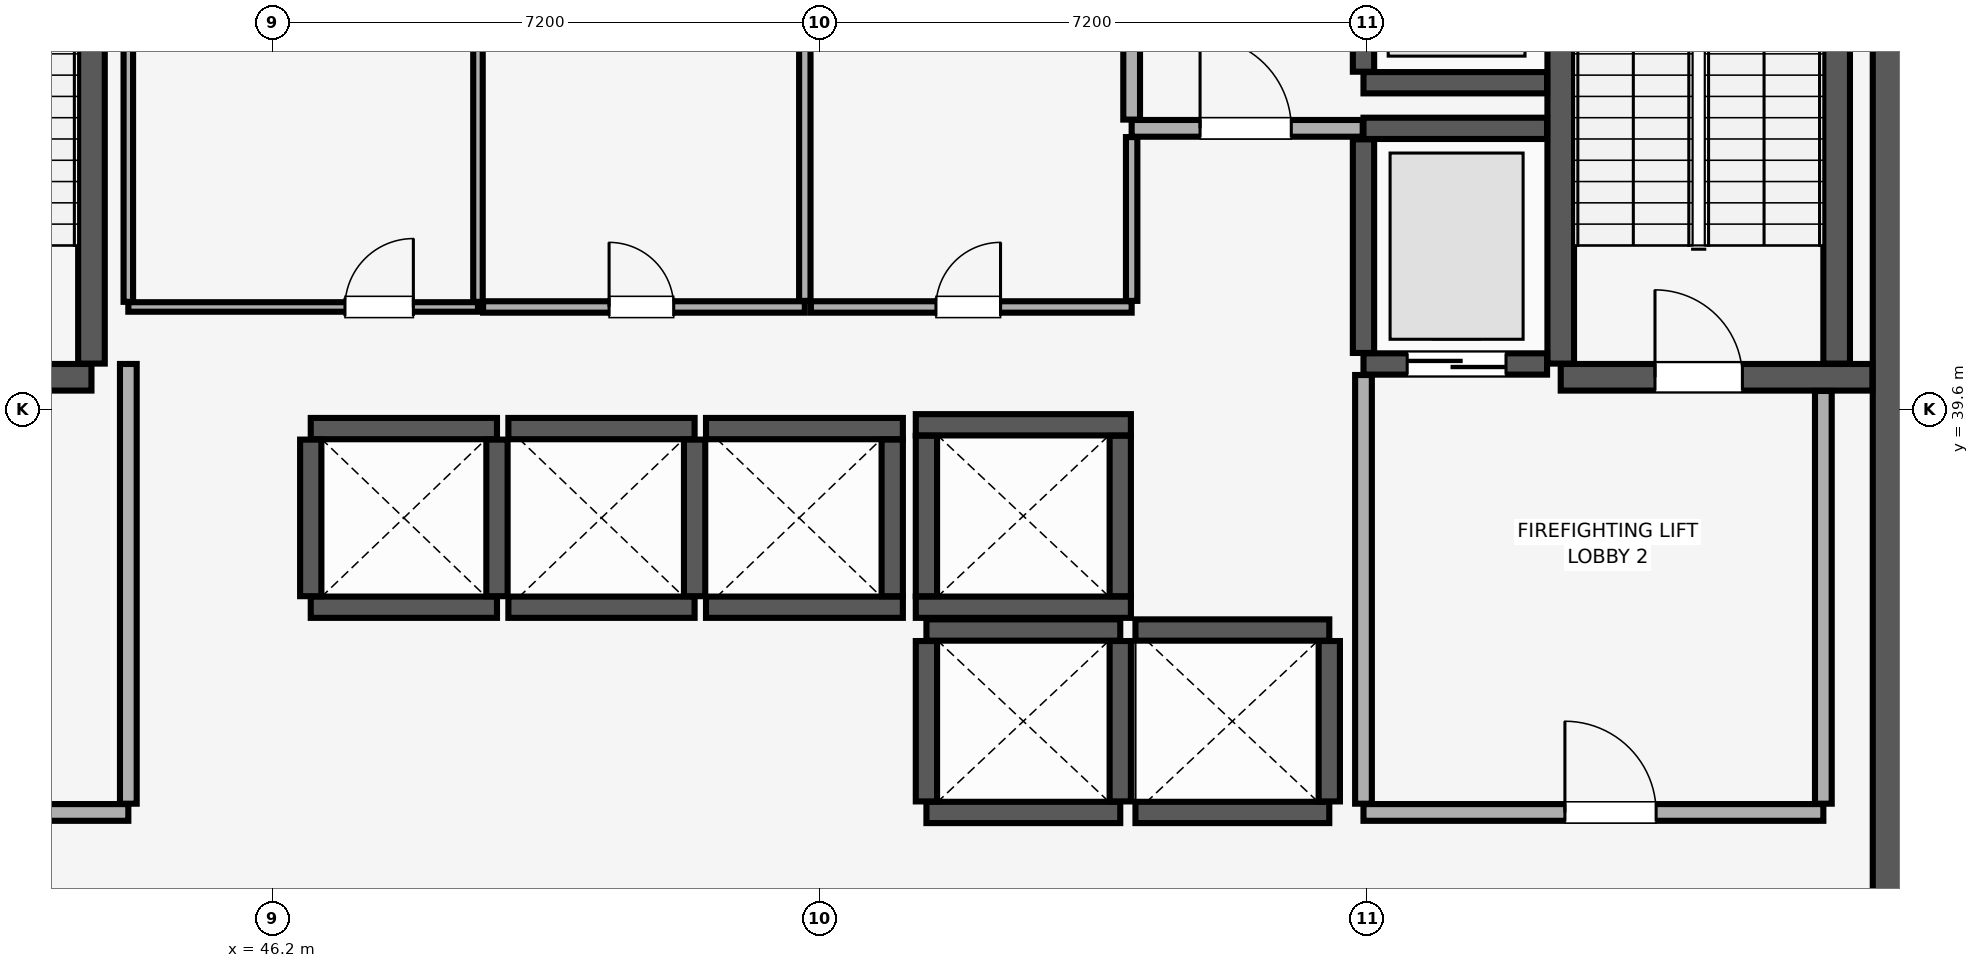
"""IFC4 building model, lengths in metres.
Left out: names, types, materials, properties, quantities, classifications, styles, units other than length and angle.
Written with IfcOpenShell. Run it as: python <this file> out.ifc"""

import sys

from ifc_helpers import new_model, si_unit, direction, frame, frame_2d, origin, place, context, subcontext, project, spatial, rectangle, extrude, element, fill, save


model = new_model("IFC4")
c1 = context("Model", 3, precision=1e-05, world=origin(), true_north=direction((0.0, 1.0)))
c2 = subcontext(c1, "Body", "Model", "MODEL_VIEW")
j1 = project(units=[si_unit("LENGTHUNIT", "METRE"), si_unit("PLANEANGLEUNIT", "RADIAN")], contexts=[c1])
p1 = place(None, origin())
s1 = spatial("IfcSite", under=j1, at=p1, CompositionType="ELEMENT")
p2 = place(p1, origin())
s2 = spatial("IfcBuilding", under=s1, at=p2, CompositionType="ELEMENT")
p3 = place(p2, frame((0.0, 0.0, 46.4)))
s3 = spatial("IfcBuildingStorey", under=s2, at=p3, CompositionType="ELEMENT", Elevation=46.4)
p4 = place(p3, frame((67.8, 29.4, 0.0), z_axis=(0.0, 0.0, 1.0), x_axis=(0.0, 1.0, 0.0)))
e1 = element("IfcWall", 1, at=p4, inside=s3, PredefinedType="SHEAR", context=c2, shape_type="SweptSolid", body=[
    extrude(rectangle(XDim=19.2, YDim=1.1, at=frame_2d((9.6, 0.0))), origin(), (0.0, 0.0, 1.0), 3.51),
])
p5 = place(p3, frame((40.185, 40.025, 0.0), z_axis=(0.0, 0.0, 1.0), x_axis=(1.0, 0.0, 0.0)))
e2 = element("IfcWall", 2, at=p5, inside=s3, PredefinedType="SHEAR", context=c2, shape_type="SweptSolid", body=[
    extrude(rectangle(XDim=3.63, YDim=0.35, at=frame_2d((1.815, 0.0))), origin(), (0.0, 0.0, 1.0), 3.51),
])
p6 = place(p5, frame((1.24, 0.0, 0.0)))
e3 = element("IfcOpeningElement", 3, at=p6, cuts=e2, PredefinedType="OPENING", context=c2, shape_type="SweptSolid", body=[
    extrude(rectangle(XDim=1.15, YDim=2.15, at=frame_2d((0.575, 1.075))), frame((0.0, 0.185, 0.0), z_axis=(0.0, -1.0, 0.0), x_axis=(1.0, 0.0, 0.0)), (0.0, 0.0, 1.0), 0.37),
])
p7 = place(p3, frame((43.815, 40.205, 0.0), z_axis=(0.0, 0.0, 1.0), x_axis=(0.0, 1.0, 0.0)))
e4 = element("IfcWall", 4, at=p7, inside=s3, PredefinedType="SHEAR", context=c2, shape_type="SweptSolid", body=[
    extrude(rectangle(XDim=8.09, YDim=0.35, at=frame_2d((4.045, 0.0))), origin(), (0.0, 0.0, 1.0), 3.51),
])
p8 = place(p3, frame((63.145, 40.025, 0.0), z_axis=(0.0, 0.0, 1.0), x_axis=(1.0, 0.0, 0.0)))
e5 = element("IfcWall", 5, at=p8, inside=s3, PredefinedType="SHEAR", context=c2, shape_type="SweptSolid", body=[
    extrude(rectangle(XDim=4.1, YDim=0.35, at=frame_2d((2.05, 0.0))), origin(), (0.0, 0.0, 1.0), 3.51),
])
p9 = place(p8, frame((1.24, 0.0, 0.0)))
e6 = element("IfcOpeningElement", 6, at=p9, cuts=e5, PredefinedType="OPENING", context=c2, shape_type="SweptSolid", body=[
    extrude(rectangle(XDim=1.15, YDim=2.15, at=frame_2d((0.575, 1.075))), frame((0.0, 0.185, 0.0), z_axis=(0.0, -1.0, 0.0), x_axis=(1.0, 0.0, 0.0)), (0.0, 0.0, 1.0), 0.37),
])
for number, where, z_axis, x_axis in (
    (7, (63.145, 40.205, 0.0), (0.0, 0.0, 1.0), (0.0, 1.0, 0.0)),
    (8, (66.775, 40.205, 0.0), (0.0, 0.0, 1.0), (0.0, 1.0, 0.0)),
):
    element("IfcWall", number, at=place(p3, frame(where, z_axis=z_axis, x_axis=x_axis)), inside=s3, PredefinedType="SHEAR", context=c2, shape_type="SweptSolid", body=[
        extrude(rectangle(XDim=8.09, YDim=0.35, at=frame_2d((4.045, 0.0))), origin(), (0.0, 0.0, 1.0), 3.51),
    ])
for number, where, z_axis, x_axis in (
    (9, (46.7, 37.0, 0.0), (0.0, 0.0, 1.0), (1.0, 0.0, 0.0)),
    (10, (46.7, 39.35, 0.0), (0.0, 0.0, 1.0), (1.0, 0.0, 0.0)),
):
    element("IfcWall", number, at=place(p3, frame(where, z_axis=z_axis, x_axis=x_axis)), inside=s3, PredefinedType="SHEAR", context=c2, shape_type="SweptSolid", body=[
        extrude(rectangle(XDim=2.45, YDim=0.28, at=frame_2d((1.225, 0.0))), origin(), (0.0, 0.0, 1.0), 3.51),
    ])
for number, where, z_axis, x_axis in (
    (11, (46.7, 37.145, 0.0), (0.0, 0.0, 1.0), (0.0, 1.0, 0.0)),
    (12, (49.15, 37.145, 0.0), (0.0, 0.0, 1.0), (0.0, 1.0, 0.0)),
):
    element("IfcWall", number, at=place(p3, frame(where, z_axis=z_axis, x_axis=x_axis)), inside=s3, PredefinedType="SHEAR", context=c2, shape_type="SweptSolid", body=[
        extrude(rectangle(XDim=2.06, YDim=0.28, at=frame_2d((1.03, 0.0))), origin(), (0.0, 0.0, 1.0), 3.51),
    ])
for number, where, z_axis, x_axis in (
    (13, (49.3, 37.0, 0.0), (0.0, 0.0, 1.0), (1.0, 0.0, 0.0)),
    (14, (49.3, 39.35, 0.0), (0.0, 0.0, 1.0), (1.0, 0.0, 0.0)),
):
    element("IfcWall", number, at=place(p3, frame(where, z_axis=z_axis, x_axis=x_axis)), inside=s3, PredefinedType="SHEAR", context=c2, shape_type="SweptSolid", body=[
        extrude(rectangle(XDim=2.45, YDim=0.28, at=frame_2d((1.225, 0.0))), origin(), (0.0, 0.0, 1.0), 3.51),
    ])
p10 = place(p3, frame((51.75, 37.145, 0.0), z_axis=(0.0, 0.0, 1.0), x_axis=(0.0, 1.0, 0.0)))
e15 = element("IfcWall", 15, at=p10, inside=s3, PredefinedType="SHEAR", context=c2, shape_type="SweptSolid", body=[
    extrude(rectangle(XDim=2.06, YDim=0.28, at=frame_2d((1.03, 0.0))), origin(), (0.0, 0.0, 1.0), 3.51),
])
for number, where, z_axis, x_axis in (
    (16, (51.9, 37.0, 0.0), (0.0, 0.0, 1.0), (1.0, 0.0, 0.0)),
    (17, (51.9, 39.35, 0.0), (0.0, 0.0, 1.0), (1.0, 0.0, 0.0)),
):
    element("IfcWall", number, at=place(p3, frame(where, z_axis=z_axis, x_axis=x_axis)), inside=s3, PredefinedType="SHEAR", context=c2, shape_type="SweptSolid", body=[
        extrude(rectangle(XDim=2.59, YDim=0.28, at=frame_2d((1.295, 0.0))), origin(), (0.0, 0.0, 1.0), 3.51),
    ])
p11 = place(p3, frame((54.35, 37.145, 0.0), z_axis=(0.0, 0.0, 1.0), x_axis=(0.0, 1.0, 0.0)))
e18 = element("IfcWall", 18, at=p11, inside=s3, PredefinedType="SHEAR", context=c2, shape_type="SweptSolid", body=[
    extrude(rectangle(XDim=2.06, YDim=0.28, at=frame_2d((1.03, 0.0))), origin(), (0.0, 0.0, 1.0), 3.51),
])
for number, where, z_axis, x_axis in (
    (19, (54.8, 34.3, 0.0), (0.0, 0.0, 1.0), (1.0, 0.0, 0.0)),
    (20, (54.8, 36.7, 0.0), (0.0, 0.0, 1.0), (1.0, 0.0, 0.0)),
):
    element("IfcWall", number, at=place(p3, frame(where, z_axis=z_axis, x_axis=x_axis)), inside=s3, PredefinedType="SHEAR", context=c2, shape_type="SweptSolid", body=[
        extrude(rectangle(XDim=2.55, YDim=0.28, at=frame_2d((1.275, 0.0))), origin(), (0.0, 0.0, 1.0), 3.51),
    ])
for number, where, z_axis, x_axis in (
    (21, (54.8, 34.445, 0.0), (0.0, 0.0, 1.0), (0.0, 1.0, 0.0)),
    (22, (57.35, 34.445, 0.0), (0.0, 0.0, 1.0), (0.0, 1.0, 0.0)),
):
    element("IfcWall", number, at=place(p3, frame(where, z_axis=z_axis, x_axis=x_axis)), inside=s3, PredefinedType="SHEAR", context=c2, shape_type="SweptSolid", body=[
        extrude(rectangle(XDim=2.11, YDim=0.28, at=frame_2d((1.055, 0.0))), origin(), (0.0, 0.0, 1.0), 3.51),
    ])
for number, where, z_axis, x_axis in (
    (23, (57.55, 34.3, 0.0), (0.0, 0.0, 1.0), (1.0, 0.0, 0.0)),
    (24, (57.55, 36.7, 0.0), (0.0, 0.0, 1.0), (1.0, 0.0, 0.0)),
):
    element("IfcWall", number, at=place(p3, frame(where, z_axis=z_axis, x_axis=x_axis)), inside=s3, PredefinedType="SHEAR", context=c2, shape_type="SweptSolid", body=[
        extrude(rectangle(XDim=2.55, YDim=0.28, at=frame_2d((1.275, 0.0))), origin(), (0.0, 0.0, 1.0), 3.51),
    ])
p12 = place(p3, frame((60.1, 34.445, 0.0), z_axis=(0.0, 0.0, 1.0), x_axis=(0.0, 1.0, 0.0)))
e25 = element("IfcWall", 25, at=p12, inside=s3, PredefinedType="SHEAR", context=c2, shape_type="SweptSolid", body=[
    extrude(rectangle(XDim=2.11, YDim=0.28, at=frame_2d((1.055, 0.0))), origin(), (0.0, 0.0, 1.0), 3.51),
])
for number, where, z_axis, x_axis in (
    (26, (54.66, 37.0, 0.0), (0.0, 0.0, 1.0), (1.0, 0.0, 0.0)),
    (27, (54.66, 39.4, 0.0), (0.0, 0.0, 1.0), (1.0, 0.0, 0.0)),
):
    element("IfcWall", number, at=place(p3, frame(where, z_axis=z_axis, x_axis=x_axis)), inside=s3, PredefinedType="SHEAR", context=c2, shape_type="SweptSolid", body=[
        extrude(rectangle(XDim=2.83, YDim=0.28, at=frame_2d((1.415, 0.0))), origin(), (0.0, 0.0, 1.0), 3.51),
    ])
for number, where, z_axis, x_axis in (
    (28, (54.8, 37.145, 0.0), (0.0, 0.0, 1.0), (0.0, 1.0, 0.0)),
    (29, (57.35, 37.145, 0.0), (0.0, 0.0, 1.0), (0.0, 1.0, 0.0)),
):
    element("IfcWall", number, at=place(p3, frame(where, z_axis=z_axis, x_axis=x_axis)), inside=s3, PredefinedType="SHEAR", context=c2, shape_type="SweptSolid", body=[
        extrude(rectangle(XDim=2.11, YDim=0.28, at=frame_2d((1.055, 0.0))), origin(), (0.0, 0.0, 1.0), 3.51),
    ])
p13 = place(p3, frame((60.55, 40.2, 0.0), z_axis=(0.0, 0.0, 1.0), x_axis=(1.0, 0.0, 0.0)))
e30 = element("IfcWall", 30, at=p13, inside=s3, PredefinedType="SHEAR", context=c2, shape_type="SweptSolid", body=[
    extrude(rectangle(XDim=2.415, YDim=0.28, at=frame_2d((1.208, 0.0))), origin(), (0.0, 0.0, 1.0), 3.51),
])
p14 = place(p13, frame((0.575, 0.0, 0.0)))
e31 = element("IfcOpeningElement", 31, at=p14, cuts=e30, PredefinedType="OPENING", context=c2, shape_type="SweptSolid", body=[
    extrude(rectangle(XDim=1.3, YDim=2.3, at=frame_2d((0.65, 1.15))), frame((0.0, 0.15, 0.0), z_axis=(0.0, -1.0, 0.0), x_axis=(1.0, 0.0, 0.0)), (0.0, 0.0, 1.0), 0.3),
])
p15 = place(p3, frame((60.55, 43.3, 0.0), z_axis=(0.0, 0.0, 1.0), x_axis=(1.0, 0.0, 0.0)))
e32 = element("IfcWall", 32, at=p15, inside=s3, PredefinedType="SHEAR", context=c2, shape_type="SweptSolid", body=[
    extrude(rectangle(XDim=2.415, YDim=0.28, at=frame_2d((1.208, 0.0))), origin(), (0.0, 0.0, 1.0), 3.51),
])
p16 = place(p3, frame((60.55, 40.345, 0.0), z_axis=(0.0, 0.0, 1.0), x_axis=(0.0, 1.0, 0.0)))
e33 = element("IfcWall", 33, at=p16, inside=s3, PredefinedType="SHEAR", context=c2, shape_type="SweptSolid", body=[
    extrude(rectangle(XDim=2.81, YDim=0.28, at=frame_2d((1.405, 0.0))), origin(), (0.0, 0.0, 1.0), 3.51),
])
p17 = place(p3, frame((60.55, 43.9, 0.0), z_axis=(0.0, 0.0, 1.0), x_axis=(1.0, 0.0, 0.0)))
e34 = element("IfcWall", 34, at=p17, inside=s3, PredefinedType="SHEAR", context=c2, shape_type="SweptSolid", body=[
    extrude(rectangle(XDim=2.415, YDim=0.28, at=frame_2d((1.208, 0.0))), origin(), (0.0, 0.0, 1.0), 3.51),
])
p18 = place(p3, frame((60.55, 44.045, 0.0), z_axis=(0.0, 0.0, 1.0), x_axis=(0.0, 1.0, 0.0)))
e35 = element("IfcWall", 35, at=p18, inside=s3, PredefinedType="SHEAR", context=c2, shape_type="SweptSolid", body=[
    extrude(rectangle(XDim=3.11, YDim=0.28, at=frame_2d((1.555, 0.0))), origin(), (0.0, 0.0, 1.0), 3.51),
])
p19 = place(p18, frame((0.905, 0.0, 0.0)))
e36 = element("IfcOpeningElement", 36, at=p19, cuts=e35, PredefinedType="OPENING", context=c2, shape_type="SweptSolid", body=[
    extrude(rectangle(XDim=1.3, YDim=2.3, at=frame_2d((0.65, 1.15))), frame((0.0, 0.15, 0.0), z_axis=(0.0, -1.0, 0.0), x_axis=(1.0, 0.0, 0.0)), (0.0, 0.0, 1.0), 0.3),
])
p20 = place(p3, frame((60.55, 34.3, 0.0), z_axis=(0.0, 0.0, 1.0), x_axis=(1.0, 0.0, 0.0)))
e37 = element("IfcWall", 37, at=p20, inside=s3, PredefinedType="PARTITIONING", context=c2, shape_type="SweptSolid", body=[
    extrude(rectangle(XDim=6.05, YDim=0.22, at=frame_2d((3.025, 0.0))), origin(), (0.0, 0.0, 1.0), 3.51),
])
p21 = place(p20, frame((2.65, 0.0, 0.0)))
e38 = element("IfcOpeningElement", 38, at=p21, cuts=e37, PredefinedType="OPENING", context=c2, shape_type="SweptSolid", body=[
    extrude(rectangle(XDim=1.2, YDim=2.15, at=frame_2d((0.6, 1.075))), frame((0.0, 0.12, 0.0), z_axis=(0.0, -1.0, 0.0), x_axis=(1.0, 0.0, 0.0)), (0.0, 0.0, 1.0), 0.24),
])
p22 = place(p3, frame((60.55, 34.415, 0.0), z_axis=(0.0, 0.0, 1.0), x_axis=(0.0, 1.0, 0.0)))
e39 = element("IfcWall", 39, at=p22, inside=s3, PredefinedType="PARTITIONING", context=c2, shape_type="SweptSolid", body=[
    extrude(rectangle(XDim=5.64, YDim=0.22, at=frame_2d((2.82, 0.0))), origin(), (0.0, 0.0, 1.0), 3.51),
])
p23 = place(p3, frame((66.6, 34.415, 0.0), z_axis=(0.0, 0.0, 1.0), x_axis=(0.0, 1.0, 0.0)))
e40 = element("IfcWall", 40, at=p23, inside=s3, PredefinedType="PARTITIONING", context=c2, shape_type="SweptSolid", body=[
    extrude(rectangle(XDim=5.43, YDim=0.22, at=frame_2d((2.715, 0.0))), origin(), (0.0, 0.0, 1.0), 3.51),
])
p24 = place(p3, frame((39.7, 34.3, 0.0), z_axis=(0.0, 0.0, 1.0), x_axis=(1.0, 0.0, 0.0)))
e41 = element("IfcWall", 41, at=p24, inside=s3, PredefinedType="PARTITIONING", context=c2, shape_type="SweptSolid", body=[
    extrude(rectangle(XDim=4.6, YDim=0.22, at=frame_2d((2.3, 0.0))), origin(), (0.0, 0.0, 1.0), 3.51),
])
p25 = place(p24, frame((1.7, 0.0, 0.0)))
e42 = element("IfcOpeningElement", 42, at=p25, cuts=e41, PredefinedType="OPENING", context=c2, shape_type="SweptSolid", body=[
    extrude(rectangle(XDim=1.2, YDim=2.15, at=frame_2d((0.6, 1.075))), frame((0.0, 0.12, 0.0), z_axis=(0.0, -1.0, 0.0), x_axis=(1.0, 0.0, 0.0)), (0.0, 0.0, 1.0), 0.24),
])
p26 = place(p3, frame((44.3, 34.415, 0.0), z_axis=(0.0, 0.0, 1.0), x_axis=(0.0, 1.0, 0.0)))
e43 = element("IfcWall", 43, at=p26, inside=s3, PredefinedType="PARTITIONING", context=c2, shape_type="SweptSolid", body=[
    extrude(rectangle(XDim=5.785, YDim=0.22, at=frame_2d((2.893, 0.0))), origin(), (0.0, 0.0, 1.0), 3.51),
])
p27 = place(p3, frame((57.5, 43.3, 0.0), z_axis=(0.0, 0.0, 1.0), x_axis=(1.0, 0.0, 0.0)))
e44 = element("IfcWall", 44, at=p27, inside=s3, PredefinedType="PARTITIONING", context=c2, shape_type="SweptSolid", body=[
    extrude(rectangle(XDim=3.04, YDim=0.22, at=frame_2d((1.52, 0.0))), origin(), (0.0, 0.0, 1.0), 3.51),
])
p28 = place(p27, frame((0.9, 0.0, 0.0)))
e45 = element("IfcOpeningElement", 45, at=p28, cuts=e44, PredefinedType="OPENING", context=c2, shape_type="SweptSolid", body=[
    extrude(rectangle(XDim=1.2, YDim=2.15, at=frame_2d((0.6, 1.075))), frame((0.0, 0.12, 0.0), z_axis=(0.0, -1.0, 0.0), x_axis=(1.0, 0.0, 0.0)), (0.0, 0.0, 1.0), 0.24),
])
p29 = place(p3, frame((57.5, 43.415, 0.0), z_axis=(0.0, 0.0, 1.0), x_axis=(0.0, 1.0, 0.0)))
e46 = element("IfcWall", 46, at=p29, inside=s3, PredefinedType="PARTITIONING", context=c2, shape_type="SweptSolid", body=[
    extrude(rectangle(XDim=5.435, YDim=0.22, at=frame_2d((2.718, 0.0))), origin(), (0.0, 0.0, 1.0), 3.51),
])
p30 = place(p3, frame((44.3, 40.95, 0.0), z_axis=(0.0, 0.0, 1.0), x_axis=(1.0, 0.0, 0.0)))
e47 = element("IfcWall", 47, at=p30, inside=s3, PredefinedType="PARTITIONING", context=c2, shape_type="SweptSolid", body=[
    extrude(rectangle(XDim=4.6, YDim=0.125, at=frame_2d((2.3, 0.0))), origin(), (0.0, 0.0, 1.0), 3.51),
])
p31 = place(p30, frame((2.85, 0.0, 0.0)))
e48 = element("IfcOpeningElement", 48, at=p31, cuts=e47, PredefinedType="OPENING", context=c2, shape_type="SweptSolid", body=[
    extrude(rectangle(XDim=0.9, YDim=2.1, at=frame_2d((0.45, 1.05))), frame((0.0, 0.073, 0.0), z_axis=(0.0, -1.0, 0.0), x_axis=(1.0, 0.0, 0.0)), (0.0, 0.0, 1.0), 0.145),
])
for number, where, z_axis, x_axis in (
    (49, (44.3, 41.018, 0.0), (0.0, 0.0, 1.0), (0.0, 1.0, 0.0)),
    (50, (48.9, 41.018, 0.0), (0.0, 0.0, 1.0), (0.0, 1.0, 0.0)),
):
    element("IfcWall", number, at=place(p3, frame(where, z_axis=z_axis, x_axis=x_axis)), inside=s3, PredefinedType="PARTITIONING", context=c2, shape_type="SweptSolid", body=[
        extrude(rectangle(XDim=3.515, YDim=0.125, at=frame_2d((1.757, 0.0))), origin(), (0.0, 0.0, 1.0), 3.51),
    ])
p32 = place(p3, frame((48.968, 40.95, 0.0), z_axis=(0.0, 0.0, 1.0), x_axis=(1.0, 0.0, 0.0)))
e51 = element("IfcWall", 51, at=p32, inside=s3, PredefinedType="PARTITIONING", context=c2, shape_type="SweptSolid", body=[
    extrude(rectangle(XDim=4.232, YDim=0.15, at=frame_2d((2.116, 0.0))), origin(), (0.0, 0.0, 1.0), 3.51),
])
p33 = place(p32, frame((1.657, 0.0, 0.0)))
e52 = element("IfcOpeningElement", 52, at=p33, cuts=e51, PredefinedType="OPENING", context=c2, shape_type="SweptSolid", body=[
    extrude(rectangle(XDim=0.85, YDim=2.1, at=frame_2d((0.425, 1.05))), frame((0.0, 0.085, 0.0), z_axis=(0.0, -1.0, 0.0), x_axis=(1.0, 0.0, 0.0)), (0.0, 0.0, 1.0), 0.17),
])
p34 = place(p3, frame((53.2, 41.03, 0.0), z_axis=(0.0, 0.0, 1.0), x_axis=(0.0, 1.0, 0.0)))
e53 = element("IfcWall", 53, at=p34, inside=s3, PredefinedType="PARTITIONING", context=c2, shape_type="SweptSolid", body=[
    extrude(rectangle(XDim=7.82, YDim=0.15, at=frame_2d((3.91, 0.0))), origin(), (0.0, 0.0, 1.0), 3.51),
])
p35 = place(p3, frame((53.28, 40.95, 0.0), z_axis=(0.0, 0.0, 1.0), x_axis=(1.0, 0.0, 0.0)))
e54 = element("IfcWall", 54, at=p35, inside=s3, PredefinedType="PARTITIONING", context=c2, shape_type="SweptSolid", body=[
    extrude(rectangle(XDim=4.22, YDim=0.15, at=frame_2d((2.11, 0.0))), origin(), (0.0, 0.0, 1.0), 3.51),
])
p36 = place(p35, frame((1.645, 0.0, 0.0)))
e55 = element("IfcOpeningElement", 55, at=p36, cuts=e54, PredefinedType="OPENING", context=c2, shape_type="SweptSolid", body=[
    extrude(rectangle(XDim=0.85, YDim=2.1, at=frame_2d((0.425, 1.05))), frame((0.0, 0.085, 0.0), z_axis=(0.0, -1.0, 0.0), x_axis=(1.0, 0.0, 0.0)), (0.0, 0.0, 1.0), 0.17),
])
p37 = place(p3, frame((57.5, 41.03, 0.0), z_axis=(0.0, 0.0, 1.0), x_axis=(0.0, 1.0, 0.0)))
e56 = element("IfcWall", 56, at=p37, inside=s3, PredefinedType="PARTITIONING", context=c2, shape_type="SweptSolid", body=[
    extrude(rectangle(XDim=2.155, YDim=0.15, at=frame_2d((1.078, 0.0))), origin(), (0.0, 0.0, 1.0), 3.51),
])
p38 = place(p9, origin())
e57 = element("IfcDoor", 57, at=p38, inside=s3, OperationType="SINGLE_SWING_LEFT", PredefinedType="DOOR", context=c2, shape_type="SweptSolid", body=[
    extrude(rectangle(XDim=1.15, YDim=2.15, at=frame_2d((0.575, 1.075))), frame((0.0, 0.025, 0.0), z_axis=(0.0, -1.0, 0.0), x_axis=(1.0, 0.0, 0.0)), (0.0, 0.0, 1.0), 0.05),
])
fill(e6, e57)
p39 = place(p14, origin())
e58 = element("IfcDoor", 58, at=p39, inside=s3, OperationType="DOUBLE_DOOR_SLIDING", PredefinedType="DOOR", context=c2, shape_type="SweptSolid", body=[
    extrude(rectangle(XDim=1.3, YDim=2.3, at=frame_2d((0.65, 1.15))), frame((0.0, 0.025, 0.0), z_axis=(0.0, -1.0, 0.0), x_axis=(1.0, 0.0, 0.0)), (0.0, 0.0, 1.0), 0.05),
])
fill(e31, e58)
p40 = place(p21, origin())
e59 = element("IfcDoor", 59, at=p40, inside=s3, OperationType="SINGLE_SWING_LEFT", PredefinedType="DOOR", context=c2, shape_type="SweptSolid", body=[
    extrude(rectangle(XDim=1.2, YDim=2.15, at=frame_2d((0.6, 1.075))), frame((0.0, 0.025, 0.0), z_axis=(0.0, -1.0, 0.0), x_axis=(1.0, 0.0, 0.0)), (0.0, 0.0, 1.0), 0.05),
])
fill(e38, e59)
p41 = place(p28, origin())
e60 = element("IfcDoor", 60, at=p41, inside=s3, OperationType="SINGLE_SWING_LEFT", PredefinedType="DOOR", context=c2, shape_type="SweptSolid", body=[
    extrude(rectangle(XDim=1.2, YDim=2.15, at=frame_2d((0.6, 1.075))), frame((0.0, 0.025, 0.0), z_axis=(0.0, -1.0, 0.0), x_axis=(1.0, 0.0, 0.0)), (0.0, 0.0, 1.0), 0.05),
])
fill(e45, e60)
p42 = place(p31, origin())
e61 = element("IfcDoor", 61, at=p42, inside=s3, OperationType="SINGLE_SWING_RIGHT", PredefinedType="DOOR", context=c2, shape_type="SweptSolid", body=[
    extrude(rectangle(XDim=0.9, YDim=2.1, at=frame_2d((0.45, 1.05))), frame((0.0, 0.025, 0.0), z_axis=(0.0, -1.0, 0.0), x_axis=(1.0, 0.0, 0.0)), (0.0, 0.0, 1.0), 0.05),
])
fill(e48, e61)
p43 = place(p33, origin())
e62 = element("IfcDoor", 62, at=p43, inside=s3, OperationType="SINGLE_SWING_LEFT", PredefinedType="DOOR", context=c2, shape_type="SweptSolid", body=[
    extrude(rectangle(XDim=0.85, YDim=2.1, at=frame_2d((0.425, 1.05))), frame((0.0, 0.025, 0.0), z_axis=(0.0, -1.0, 0.0), x_axis=(1.0, 0.0, 0.0)), (0.0, 0.0, 1.0), 0.05),
])
fill(e52, e62)
p44 = place(p36, origin())
e63 = element("IfcDoor", 63, at=p44, inside=s3, OperationType="SINGLE_SWING_RIGHT", PredefinedType="DOOR", context=c2, shape_type="SweptSolid", body=[
    extrude(rectangle(XDim=0.85, YDim=2.1, at=frame_2d((0.425, 1.05))), frame((0.0, 0.025, 0.0), z_axis=(0.0, -1.0, 0.0), x_axis=(1.0, 0.0, 0.0)), (0.0, 0.0, 1.0), 0.05),
])
fill(e55, e63)
save(model, sys.argv[1])
